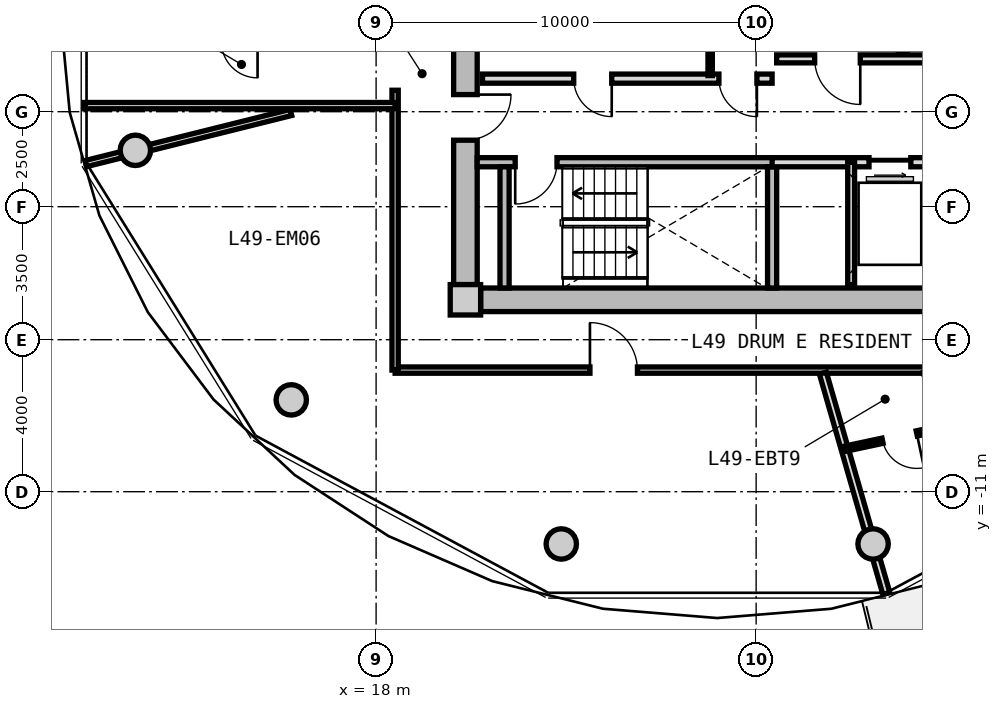
"""IFC4 building model, lengths in metres.
Left out: names, types, materials, properties, quantities, classifications, styles, units other than length and angle.
Written with IfcOpenShell. Run it as: python <this file> out.ifc"""

import sys

from ifc_helpers import new_model, si_unit, direction, frame, frame_2d, origin, origin_2d, place, context, subcontext, project, spatial, rectangle, circle, extrude, source, transform, mapped, element, fill, save


model = new_model("IFC4")
c1 = context("Model", 3, precision=1e-05, world=origin(), true_north=direction((0.0, 1.0)))
c2 = subcontext(c1, "Body", "Model", "MODEL_VIEW")
j1 = project(units=[si_unit("LENGTHUNIT", "METRE"), si_unit("PLANEANGLEUNIT", "RADIAN")], contexts=[c1])
p1 = place(None, origin())
s1 = spatial("IfcSite", under=j1, at=p1, CompositionType="ELEMENT")
p2 = place(p1, origin())
s2 = spatial("IfcBuilding", under=s1, at=p2, CompositionType="ELEMENT")
p3 = place(p2, frame((0.0, 0.0, 158.7)))
s3 = spatial("IfcBuildingStorey", under=s2, at=p3, CompositionType="ELEMENT", Elevation=158.7)
m1 = source(origin(), c2, "Body", "SweptSolid", [
    extrude(rectangle(XDim=0.8, YDim=0.8, at=origin_2d()), origin(), (0.0, 0.0, 1.0), 3.05),
])
p4 = place(p3, frame((20.35, -5.95, 0.0), z_axis=(0.0, 0.0, 1.0), x_axis=(1.0, 0.0, 0.0)))
e1 = element("IfcColumn", 1, at=p4, inside=s3, PredefinedType="COLUMN", context=c2, shape_type="MappedRepresentation", body=[
    mapped(m1, transform((0.0, 0.0, 0.0), x_axis=(1.0, 0.0, 0.0), y_axis=(0.0, 1.0, 0.0), z_axis=(0.0, 0.0, 1.0), scale=1.0)),
])
m2 = source(origin(), c2, "Body", "SweptSolid", [
    extrude(rectangle(XDim=14.5, YDim=0.62, at=frame_2d((7.25, 0.0))), origin(), (0.0, 0.0, 1.0), 2.81),
])
p5 = place(p3, frame((35.25, -5.95, 0.0), z_axis=(0.0, 0.0, 1.0), x_axis=(-1.0, 0.0, 0.0)))
e2 = element("IfcWall", 2, at=p5, inside=s3, PredefinedType="SHEAR", context=c2, shape_type="MappedRepresentation", body=[
    mapped(m2, transform((0.0, 0.0, 0.0), x_axis=(1.0, 0.0, 0.0), y_axis=(0.0, 1.0, 0.0), z_axis=(0.0, 0.0, 1.0), scale=1.0)),
])
m3 = source(origin(), c2, "Body", "SweptSolid", [
    extrude(rectangle(XDim=11.1, YDim=0.62, at=frame_2d((5.55, 0.0))), origin(), (0.0, 0.0, 1.0), 2.81),
])
p6 = place(p3, frame((20.35, -5.55, 0.0), z_axis=(0.0, 0.0, 1.0), x_axis=(0.0, 1.0, 0.0)))
e3 = element("IfcWall", 3, at=p6, inside=s3, PredefinedType="SHEAR", context=c2, shape_type="MappedRepresentation", body=[
    mapped(m3, transform((0.0, 0.0, 0.0), x_axis=(1.0, 0.0, 0.0), y_axis=(0.0, 1.0, 0.0), z_axis=(0.0, 0.0, 1.0), scale=1.0)),
])
p7 = place(p6, frame((3.8, 0.0, 0.0)))
e4 = element("IfcOpeningElement", 4, at=p7, cuts=e3, PredefinedType="OPENING", context=c2, shape_type="SweptSolid", body=[
    extrude(rectangle(XDim=1.2, YDim=2.15, at=frame_2d((0.6, 1.075))), frame((0.0, 0.32, 0.0), z_axis=(0.0, -1.0, 0.0), x_axis=(1.0, 0.0, 0.0)), (0.0, 0.0, 1.0), 0.64),
])
m4 = source(origin(), c2, "Body", "SweptSolid", [
    extrude(circle(Radius=0.4, at=origin_2d()), origin(), (0.0, 0.0, 1.0), 3.05),
])
for number, where, z_axis, x_axis in (
    (5, (11.665, -2.016, 0.0), (0.0, 0.0, 1.0), (1.0, 0.0, 0.0)),
    (6, (15.767, -8.584, 0.0), (0.0, 0.0, 1.0), (1.0, 0.0, 0.0)),
    (7, (22.873, -12.375, 0.0), (0.0, 0.0, 1.0), (1.0, 0.0, 0.0)),
    (8, (31.077, -12.375, 0.0), (0.0, 0.0, 1.0), (1.0, 0.0, 0.0)),
):
    element("IfcColumn", number, at=place(p3, frame(where, z_axis=z_axis, x_axis=x_axis)), inside=s3, PredefinedType="COLUMN", context=c2, shape_type="MappedRepresentation", body=[
        mapped(m4, transform((0.0, 0.0, 0.0), x_axis=(1.0, 0.0, 0.0), y_axis=(0.0, 1.0, 0.0), z_axis=(0.0, 0.0, 1.0), scale=1.0)),
    ])
m5 = source(origin(), c2, "Body", "SweptSolid", [
    extrude(rectangle(XDim=7.88, YDim=0.24, at=frame_2d((3.94, 0.0))), origin(), (0.0, 0.0, 1.0), 2.81),
])
p8 = place(p3, frame((20.66, -2.33, 0.0), z_axis=(0.0, 0.0, 1.0), x_axis=(1.0, 0.0, 0.0)))
e9 = element("IfcWall", 9, at=p8, inside=s3, PredefinedType="PARTITIONING", context=c2, shape_type="MappedRepresentation", body=[
    mapped(m5, transform((0.0, 0.0, 0.0), x_axis=(1.0, 0.0, 0.0), y_axis=(0.0, 1.0, 0.0), z_axis=(0.0, 0.0, 1.0), scale=1.0)),
])
p9 = place(p8, frame((1.0, 0.0, 0.0)))
e10 = element("IfcOpeningElement", 10, at=p9, cuts=e9, PredefinedType="OPENING", context=c2, shape_type="SweptSolid", body=[
    extrude(rectangle(XDim=1.1, YDim=2.15, at=frame_2d((0.55, 1.075))), frame((0.0, 0.13, 0.0), z_axis=(0.0, -1.0, 0.0), x_axis=(1.0, 0.0, 0.0)), (0.0, 0.0, 1.0), 0.26),
])
m6 = source(origin(), c2, "Body", "SweptSolid", [
    extrude(rectangle(XDim=3.19, YDim=0.24, at=frame_2d((1.595, 0.0))), origin(), (0.0, 0.0, 1.0), 2.81),
])
for number, where, z_axis, x_axis in (
    (11, (21.38, -5.64, 0.0), (0.0, 0.0, 1.0), (0.0, 1.0, 0.0)),
    (12, (28.42, -5.64, 0.0), (0.0, 0.0, 1.0), (0.0, 1.0, 0.0)),
):
    element("IfcWall", number, at=place(p3, frame(where, z_axis=z_axis, x_axis=x_axis)), inside=s3, PredefinedType="PARTITIONING", context=c2, shape_type="MappedRepresentation", body=[
        mapped(m6, transform((0.0, 0.0, 0.0), x_axis=(1.0, 0.0, 0.0), y_axis=(0.0, 1.0, 0.0), z_axis=(0.0, 0.0, 1.0), scale=1.0)),
    ])
m7 = source(origin(), c2, "Body", "SweptSolid", [
    extrude(rectangle(XDim=5.0, YDim=0.24, at=frame_2d((2.5, 0.0))), origin(), (0.0, 0.0, 1.0), 2.795),
])
p10 = place(p3, frame((31.86, 0.5, 0.0), z_axis=(0.0, 0.0, 1.0), x_axis=(0.0, 1.0, 0.0)))
e13 = element("IfcWall", 13, at=p10, inside=s3, PredefinedType="PARTITIONING", context=c2, shape_type="MappedRepresentation", body=[
    mapped(m7, transform((0.0, 0.0, 0.0), x_axis=(1.0, 0.0, 0.0), y_axis=(0.0, 1.0, 0.0), z_axis=(0.0, 0.0, 1.0), scale=1.0)),
])
p11 = place(p10, frame((3.05, 0.0, 0.0)))
e14 = element("IfcOpeningElement", 14, at=p11, cuts=e13, PredefinedType="OPENING", context=c2, shape_type="SweptSolid", body=[
    extrude(rectangle(XDim=1.3, YDim=2.2, at=frame_2d((0.65, 1.1))), frame((0.0, 0.13, 0.0), z_axis=(0.0, -1.0, 0.0), x_axis=(1.0, 0.0, 0.0)), (0.0, 0.0, 1.0), 0.26),
])
p12 = place(p10, frame((0.55, 0.0, 0.0)))
e15 = element("IfcOpeningElement", 15, at=p12, cuts=e13, PredefinedType="OPENING", context=c2, shape_type="SweptSolid", body=[
    extrude(rectangle(XDim=1.3, YDim=2.2, at=frame_2d((0.65, 1.1))), frame((0.0, 0.13, 0.0), z_axis=(0.0, -1.0, 0.0), x_axis=(1.0, 0.0, 0.0)), (0.0, 0.0, 1.0), 0.26),
])
m8 = source(origin(), c2, "Body", "SweptSolid", [
    extrude(rectangle(XDim=6.66, YDim=0.21, at=frame_2d((3.33, 0.0))), origin(), (0.0, 0.0, 1.0), 2.795),
])
p13 = place(p3, frame((28.54, 0.39, 0.0), z_axis=(0.0, 0.0, 1.0), x_axis=(1.0, 0.0, 0.0)))
e16 = element("IfcWall", 16, at=p13, inside=s3, PredefinedType="PARTITIONING", context=c2, shape_type="MappedRepresentation", body=[
    mapped(m8, transform((0.0, 0.0, 0.0), x_axis=(1.0, 0.0, 0.0), y_axis=(0.0, 1.0, 0.0), z_axis=(0.0, 0.0, 1.0), scale=1.0)),
])
p14 = place(p13, frame((1.0, 0.0, 0.0)))
e17 = element("IfcOpeningElement", 17, at=p14, cuts=e16, PredefinedType="OPENING", context=c2, shape_type="SweptSolid", body=[
    extrude(rectangle(XDim=1.2, YDim=2.15, at=frame_2d((0.6, 1.075))), frame((0.0, 0.115, 0.0), z_axis=(0.0, -1.0, 0.0), x_axis=(1.0, 0.0, 0.0)), (0.0, 0.0, 1.0), 0.23),
])
m9 = source(origin(), c2, "Body", "SweptSolid", [
    extrude(rectangle(XDim=7.62, YDim=0.24, at=frame_2d((3.81, 0.0))), origin(), (0.0, 0.0, 1.0), 2.795),
])
p15 = place(p3, frame((20.8, -0.13, 0.0), z_axis=(0.0, 0.0, 1.0), x_axis=(1.0, 0.0, 0.0)))
e18 = element("IfcWall", 18, at=p15, inside=s3, PredefinedType="PARTITIONING", context=c2, shape_type="MappedRepresentation", body=[
    mapped(m9, transform((0.0, 0.0, 0.0), x_axis=(1.0, 0.0, 0.0), y_axis=(0.0, 1.0, 0.0), z_axis=(0.0, 0.0, 1.0), scale=1.0)),
])
p16 = place(p15, frame((6.22, 0.0, 0.0)))
e19 = element("IfcOpeningElement", 19, at=p16, cuts=e18, PredefinedType="OPENING", context=c2, shape_type="SweptSolid", body=[
    extrude(rectangle(XDim=1.0, YDim=2.1, at=frame_2d((0.5, 1.05))), frame((0.0, 0.13, 0.0), z_axis=(0.0, -1.0, 0.0), x_axis=(1.0, 0.0, 0.0)), (0.0, 0.0, 1.0), 0.26),
])
p17 = place(p15, frame((2.4, 0.0, 0.0)))
e20 = element("IfcOpeningElement", 20, at=p17, cuts=e18, PredefinedType="OPENING", context=c2, shape_type="SweptSolid", body=[
    extrude(rectangle(XDim=1.0, YDim=2.1, at=frame_2d((0.5, 1.05))), frame((0.0, 0.13, 0.0), z_axis=(0.0, -1.0, 0.0), x_axis=(1.0, 0.0, 0.0)), (0.0, 0.0, 1.0), 0.26),
])
m10 = source(origin(), c2, "Body", "SweptSolid", [
    extrude(rectangle(XDim=2.33, YDim=0.115, at=frame_2d((1.165, 0.0))), origin(), (0.0, 0.0, 1.0), 2.795),
])
p18 = place(p3, frame((26.79, -0.05, 0.0), z_axis=(0.0, 0.0, 1.0), x_axis=(0.0, 1.0, 0.0)))
e21 = element("IfcWall", 21, at=p18, inside=s3, PredefinedType="PARTITIONING", context=c2, shape_type="MappedRepresentation", body=[
    mapped(m10, transform((0.0, 0.0, 0.0), x_axis=(1.0, 0.0, 0.0), y_axis=(0.0, 1.0, 0.0), z_axis=(0.0, 0.0, 1.0), scale=1.0)),
])
m11 = source(origin(), c2, "Body", "SweptSolid", [
    extrude(rectangle(XDim=4.13, YDim=0.24, at=frame_2d((2.065, 0.0))), origin(), (0.0, 0.0, 1.0), 2.795),
])
p19 = place(p3, frame((28.42, -2.33, 0.0), z_axis=(0.0, 0.0, 1.0), x_axis=(1.0, 0.0, 0.0)))
e22 = element("IfcWall", 22, at=p19, inside=s3, PredefinedType="PARTITIONING", context=c2, shape_type="MappedRepresentation", body=[
    mapped(m11, transform((0.0, 0.0, 0.0), x_axis=(1.0, 0.0, 0.0), y_axis=(0.0, 1.0, 0.0), z_axis=(0.0, 0.0, 1.0), scale=1.0)),
])
p20 = place(p19, frame((2.55, 0.0, 0.0)))
e23 = element("IfcOpeningElement", 23, at=p20, cuts=e22, PredefinedType="OPENING", context=c2, shape_type="SweptSolid", body=[
    extrude(rectangle(XDim=1.1, YDim=2.2, at=frame_2d((0.55, 1.1))), frame((0.0, 0.13, 0.0), z_axis=(0.0, -1.0, 0.0), x_axis=(1.0, 0.0, 0.0)), (0.0, 0.0, 1.0), 0.26),
])
m12 = source(origin(), c2, "Body", "SweptSolid", [
    extrude(rectangle(XDim=3.22, YDim=0.18, at=frame_2d((1.61, 0.0))), origin(), (0.0, 0.0, 1.0), 2.795),
])
p21 = place(p3, frame((30.5, -5.55, 0.0), z_axis=(0.0, 0.0, 1.0), x_axis=(0.0, 1.0, 0.0)))
e24 = element("IfcWall", 24, at=p21, inside=s3, PredefinedType="PARTITIONING", context=c2, shape_type="MappedRepresentation", body=[
    mapped(m12, transform((0.0, 0.0, 0.0), x_axis=(1.0, 0.0, 0.0), y_axis=(0.0, 1.0, 0.0), z_axis=(0.0, 0.0, 1.0), scale=1.0)),
])
m13 = source(origin(), c2, "Body", "SweptSolid", [
    extrude(rectangle(XDim=19.0, YDim=0.165, at=frame_2d((9.5, 0.0))), origin(), (0.0, 0.0, 1.0), 2.795),
])
p22 = place(p3, frame((37.5, -7.8, 0.0), z_axis=(0.0, 0.0, 1.0), x_axis=(-1.0, 0.0, 0.0)))
e25 = element("IfcWall", 25, at=p22, inside=s3, PredefinedType="PARTITIONING", context=c2, shape_type="MappedRepresentation", body=[
    mapped(m13, transform((0.0, 0.0, 0.0), x_axis=(1.0, 0.0, 0.0), y_axis=(0.0, 1.0, 0.0), z_axis=(0.0, 0.0, 1.0), scale=1.0)),
])
p23 = place(p22, frame((12.623, 0.0, 0.0)))
e26 = element("IfcOpeningElement", 26, at=p23, cuts=e25, PredefinedType="OPENING", context=c2, shape_type="SweptSolid", body=[
    extrude(rectangle(XDim=1.25, YDim=2.2, at=frame_2d((0.625, 1.1))), frame((0.0, 0.093, 0.0), z_axis=(0.0, -1.0, 0.0), x_axis=(1.0, 0.0, 0.0)), (0.0, 0.0, 1.0), 0.185),
])
m14 = source(origin(), c2, "Body", "SweptSolid", [
    extrude(rectangle(XDim=7.365, YDim=0.165, at=frame_2d((3.682, 0.0))), origin(), (0.0, 0.0, 1.0), 2.795),
])
p24 = place(p3, frame((18.5, -7.8, 0.0), z_axis=(0.0, 0.0, 1.0), x_axis=(0.0, 1.0, 0.0)))
e27 = element("IfcWall", 27, at=p24, inside=s3, PredefinedType="PARTITIONING", context=c2, shape_type="MappedRepresentation", body=[
    mapped(m14, transform((0.0, 0.0, 0.0), x_axis=(1.0, 0.0, 0.0), y_axis=(0.0, 1.0, 0.0), z_axis=(0.0, 0.0, 1.0), scale=1.0)),
])
m15 = source(origin(), c2, "Body", "SweptSolid", [
    extrude(rectangle(XDim=5.564, YDim=0.165, at=frame_2d((2.782, 0.0))), origin(), (0.0, 0.0, 1.0), 2.345),
])
p25 = place(p3, frame((15.76, -1.02, 0.0), z_axis=(0.0, 0.0, 1.0), x_axis=(-0.970315176167, -0.241843872984, 0.0)))
e28 = element("IfcWall", 28, at=p25, inside=s3, PredefinedType="PARTITIONING", context=c2, shape_type="MappedRepresentation", body=[
    mapped(m15, transform((0.0, 0.0, 0.0), x_axis=(1.0, 0.0, 0.0), y_axis=(0.0, 1.0, 0.0), z_axis=(0.0, 0.0, 1.0), scale=1.0)),
])
m16 = source(origin(), c2, "Body", "SweptSolid", [
    extrude(rectangle(XDim=8.189, YDim=0.165, at=frame_2d((4.094, 0.0))), origin(), (0.0, 0.0, 1.0), 2.795),
])
p26 = place(p3, frame((18.5, -0.84, 0.0), z_axis=(0.0, 0.0, 1.0), x_axis=(-1.0, 0.0, 0.0)))
e29 = element("IfcWall", 29, at=p26, inside=s3, PredefinedType="PARTITIONING", context=c2, shape_type="MappedRepresentation", body=[
    mapped(m16, transform((0.0, 0.0, 0.0), x_axis=(1.0, 0.0, 0.0), y_axis=(0.0, 1.0, 0.0), z_axis=(0.0, 0.0, 1.0), scale=1.0)),
])
m17 = source(origin(), c2, "Body", "SweptSolid", [
    extrude(rectangle(XDim=6.035, YDim=0.19, at=frame_2d((3.018, 0.0))), origin(), (0.0, 0.0, 1.0), 2.345),
])
p27 = place(p3, frame((29.756, -7.88, 0.0), z_axis=(0.0, 0.0, 1.0), x_axis=(0.276809454862, -0.960924828329, 0.0)))
e30 = element("IfcWall", 30, at=p27, inside=s3, PredefinedType="PARTITIONING", context=c2, shape_type="MappedRepresentation", body=[
    mapped(m17, transform((0.0, 0.0, 0.0), x_axis=(1.0, 0.0, 0.0), y_axis=(0.0, 1.0, 0.0), z_axis=(0.0, 0.0, 1.0), scale=1.0)),
])
m18 = source(origin(), c2, "Body", "SweptSolid", [
    extrude(rectangle(XDim=1.635, YDim=0.14, at=frame_2d((0.817, 0.0))), origin(), (0.0, 0.0, 1.0), 2.795),
])
p28 = place(p3, frame((32.434, -7.83, 0.0), z_axis=(0.0, 0.0, 1.0), x_axis=(0.494078690764, -0.869417188312, 0.0)))
e31 = element("IfcWall", 31, at=p28, inside=s3, PredefinedType="PARTITIONING", context=c2, shape_type="MappedRepresentation", body=[
    mapped(m18, transform((0.0, 0.0, 0.0), x_axis=(1.0, 0.0, 0.0), y_axis=(0.0, 1.0, 0.0), z_axis=(0.0, 0.0, 1.0), scale=1.0)),
])
m19 = source(origin(), c2, "Body", "SweptSolid", [
    extrude(rectangle(XDim=2.995, YDim=0.14, at=frame_2d((1.498, 0.0))), origin(), (0.0, 0.0, 1.0), 2.435),
])
p29 = place(p3, frame((33.241, -9.251, 0.0), z_axis=(0.0, 0.0, 1.0), x_axis=(-0.978075914325, -0.208248663425, 0.0)))
e32 = element("IfcWall", 32, at=p29, inside=s3, PredefinedType="PARTITIONING", context=c2, shape_type="MappedRepresentation", body=[
    mapped(m19, transform((0.0, 0.0, 0.0), x_axis=(1.0, 0.0, 0.0), y_axis=(0.0, 1.0, 0.0), z_axis=(0.0, 0.0, 1.0), scale=1.0)),
])
p30 = place(p29, frame((1.038, 0.0, 0.0)))
e33 = element("IfcOpeningElement", 33, at=p30, cuts=e32, PredefinedType="OPENING", context=c2, shape_type="SweptSolid", body=[
    extrude(rectangle(XDim=0.92, YDim=2.1, at=frame_2d((0.46, 1.05))), frame((0.0, 0.08, 0.0), z_axis=(0.0, -1.0, 0.0), x_axis=(1.0, 0.0, 0.0)), (0.0, 0.0, 1.0), 0.16),
])
m20 = source(origin(), c2, "Body", "SweptSolid", [
    extrude(rectangle(XDim=1.1, YDim=2.15, at=frame_2d((0.55, 1.075))), frame((0.0, 0.025, 0.0), z_axis=(0.0, -1.0, 0.0), x_axis=(1.0, 0.0, 0.0)), (0.0, 0.0, 1.0), 0.05),
])
p31 = place(p9, frame((1.1, 0.0, 0.0), z_axis=(0.0, 0.0, 1.0), x_axis=(-1.0, 0.0, 0.0)))
e34 = element("IfcDoor", 34, at=p31, inside=s3, OperationType="SINGLE_SWING_RIGHT", PredefinedType="DOOR", context=c2, shape_type="MappedRepresentation", body=[
    mapped(m20, transform((0.0, 0.0, 0.0), x_axis=(1.0, 0.0, 0.0), y_axis=(0.0, 1.0, 0.0), z_axis=(0.0, 0.0, 1.0), scale=1.0)),
])
fill(e10, e34)
m21 = source(origin(), c2, "Body", "SweptSolid", [
    extrude(rectangle(XDim=1.2, YDim=2.15, at=frame_2d((0.6, 1.075))), frame((0.0, 0.025, 0.0), z_axis=(0.0, -1.0, 0.0), x_axis=(1.0, 0.0, 0.0)), (0.0, 0.0, 1.0), 0.05),
])
p32 = place(p14, frame((1.2, 0.0, 0.0), z_axis=(0.0, 0.0, 1.0), x_axis=(-1.0, 0.0, 0.0)))
e35 = element("IfcDoor", 35, at=p32, inside=s3, OperationType="SINGLE_SWING_LEFT", PredefinedType="DOOR", context=c2, shape_type="MappedRepresentation", body=[
    mapped(m21, transform((0.0, 0.0, 0.0), x_axis=(1.0, 0.0, 0.0), y_axis=(0.0, 1.0, 0.0), z_axis=(0.0, 0.0, 1.0), scale=1.0)),
])
fill(e17, e35)
p33 = place(p7, frame((1.2, 0.0, 0.0), z_axis=(0.0, 0.0, 1.0), x_axis=(-1.0, 0.0, 0.0)))
e36 = element("IfcDoor", 36, at=p33, inside=s3, OperationType="SINGLE_SWING_LEFT", PredefinedType="DOOR", context=c2, shape_type="MappedRepresentation", body=[
    mapped(m21, transform((0.0, 0.0, 0.0), x_axis=(1.0, 0.0, 0.0), y_axis=(0.0, 1.0, 0.0), z_axis=(0.0, 0.0, 1.0), scale=1.0)),
])
fill(e4, e36)
m22 = source(origin(), c2, "Body", "SweptSolid", [
    extrude(rectangle(XDim=1.0, YDim=2.1, at=frame_2d((0.5, 1.05))), frame((0.0, 0.025, 0.0), z_axis=(0.0, -1.0, 0.0), x_axis=(1.0, 0.0, 0.0)), (0.0, 0.0, 1.0), 0.05),
])
p34 = place(p16, frame((1.0, 0.0, 0.0), z_axis=(0.0, 0.0, 1.0), x_axis=(-1.0, 0.0, 0.0)))
e37 = element("IfcDoor", 37, at=p34, inside=s3, OperationType="SINGLE_SWING_LEFT", PredefinedType="DOOR", context=c2, shape_type="MappedRepresentation", body=[
    mapped(m22, transform((0.0, 0.0, 0.0), x_axis=(1.0, 0.0, 0.0), y_axis=(0.0, 1.0, 0.0), z_axis=(0.0, 0.0, 1.0), scale=1.0)),
])
fill(e19, e37)
p35 = place(p17, frame((1.0, 0.0, 0.0), z_axis=(0.0, 0.0, 1.0), x_axis=(-1.0, 0.0, 0.0)))
e38 = element("IfcDoor", 38, at=p35, inside=s3, OperationType="SINGLE_SWING_LEFT", PredefinedType="DOOR", context=c2, shape_type="MappedRepresentation", body=[
    mapped(m22, transform((0.0, 0.0, 0.0), x_axis=(1.0, 0.0, 0.0), y_axis=(0.0, 1.0, 0.0), z_axis=(0.0, 0.0, 1.0), scale=1.0)),
])
fill(e20, e38)
m23 = source(origin(), c2, "Body", "SweptSolid", [
    extrude(rectangle(XDim=1.1, YDim=2.2, at=frame_2d((0.55, 1.1))), frame((0.0, 0.025, 0.0), z_axis=(0.0, -1.0, 0.0), x_axis=(1.0, 0.0, 0.0)), (0.0, 0.0, 1.0), 0.05),
])
p36 = place(p20, frame((1.1, 0.0, 0.0), z_axis=(0.0, 0.0, 1.0), x_axis=(-1.0, 0.0, 0.0)))
e39 = element("IfcDoor", 39, at=p36, inside=s3, OperationType="SLIDING_TO_RIGHT", PredefinedType="DOOR", context=c2, shape_type="MappedRepresentation", body=[
    mapped(m23, transform((0.0, 0.0, 0.0), x_axis=(1.0, 0.0, 0.0), y_axis=(0.0, 1.0, 0.0), z_axis=(0.0, 0.0, 1.0), scale=1.0)),
])
fill(e23, e39)
m24 = source(origin(), c2, "Body", "SweptSolid", [
    extrude(rectangle(XDim=1.25, YDim=2.2, at=frame_2d((0.625, 1.1))), frame((0.0, 0.025, 0.0), z_axis=(0.0, -1.0, 0.0), x_axis=(1.0, 0.0, 0.0)), (0.0, 0.0, 1.0), 0.05),
])
p37 = place(p23, frame((1.25, 0.0, 0.0), z_axis=(0.0, 0.0, 1.0), x_axis=(-1.0, 0.0, 0.0)))
e40 = element("IfcDoor", 40, at=p37, inside=s3, OperationType="SINGLE_SWING_LEFT", PredefinedType="DOOR", context=c2, shape_type="MappedRepresentation", body=[
    mapped(m24, transform((0.0, 0.0, 0.0), x_axis=(1.0, 0.0, 0.0), y_axis=(0.0, 1.0, 0.0), z_axis=(0.0, 0.0, 1.0), scale=1.0)),
])
fill(e26, e40)
m25 = source(origin(), c2, "Body", "SweptSolid", [
    extrude(rectangle(XDim=0.92, YDim=2.1, at=frame_2d((0.46, 1.05))), frame((0.0, 0.025, 0.0), z_axis=(0.0, -1.0, 0.0), x_axis=(1.0, 0.0, 0.0)), (0.0, 0.0, 1.0), 0.05),
])
p38 = place(p30, origin())
e41 = element("IfcDoor", 41, at=p38, inside=s3, OperationType="SINGLE_SWING_LEFT", PredefinedType="DOOR", context=c2, shape_type="MappedRepresentation", body=[
    mapped(m25, transform((0.0, 0.0, 0.0), x_axis=(1.0, 0.0, 0.0), y_axis=(0.0, 1.0, 0.0), z_axis=(0.0, 0.0, 1.0), scale=1.0)),
])
fill(e33, e41)
save(model, sys.argv[1])
